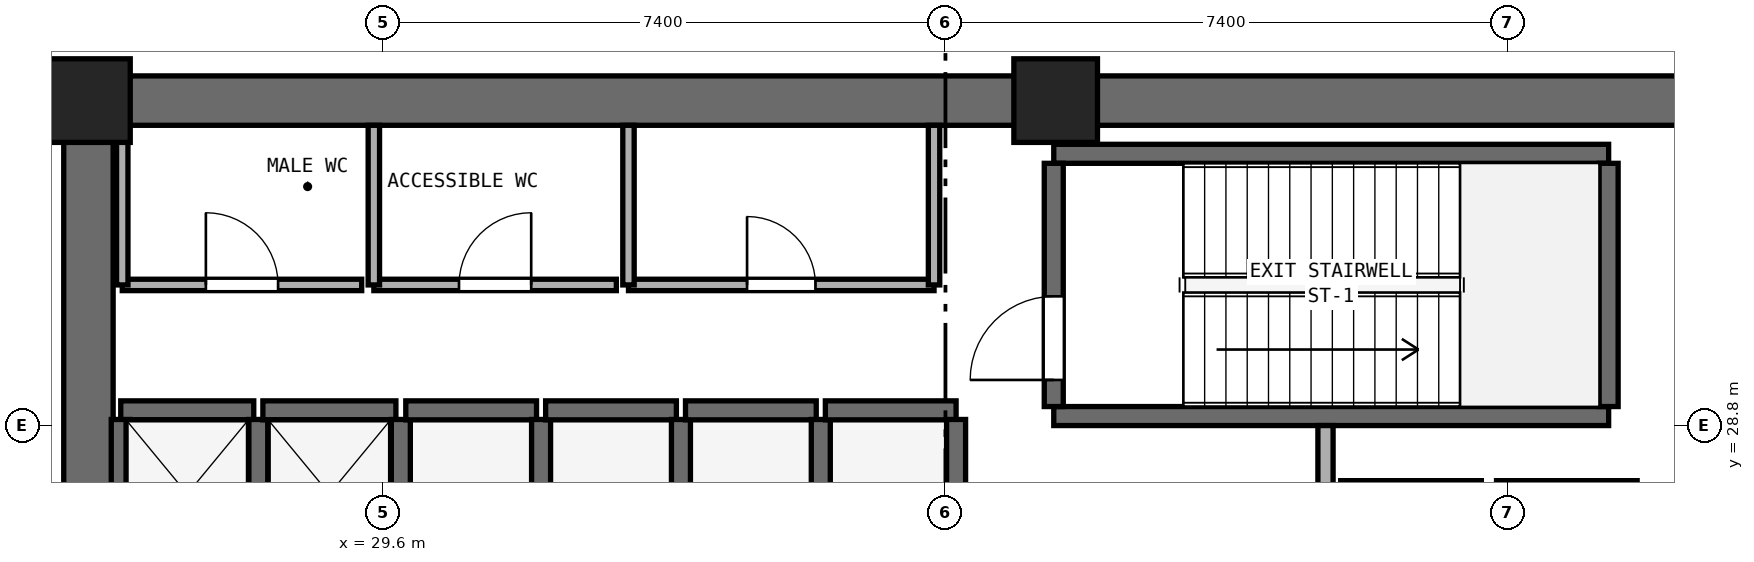
"""IFC4 building model, lengths in metres.
Left out: names, types, materials, properties, quantities, classifications, styles, units other than length and angle.
Written with IfcOpenShell. Run it as: python <this file> out.ifc"""

import sys

from ifc_helpers import new_model, si_unit, direction, frame, frame_2d, origin, origin_2d, place, context, subcontext, project, spatial, rectangle, extrude, element, fill, save


model = new_model("IFC4")
c1 = context("Model", 3, precision=1e-05, world=origin(), true_north=direction((0.0, 1.0)))
c2 = subcontext(c1, "Body", "Model", "MODEL_VIEW")
j1 = project(units=[si_unit("LENGTHUNIT", "METRE"), si_unit("PLANEANGLEUNIT", "RADIAN")], contexts=[c1])
p1 = place(None, origin())
s1 = spatial("IfcSite", under=j1, at=p1, CompositionType="ELEMENT")
p2 = place(p1, origin())
s2 = spatial("IfcBuilding", under=s1, at=p2, CompositionType="ELEMENT")
p3 = place(p2, frame((0.0, 0.0, 20.0)))
s3 = spatial("IfcBuildingStorey", under=s2, at=p3, CompositionType="ELEMENT", Elevation=20.0)
p4 = place(p3, frame((25.4, 33.075, 0.0), z_axis=(0.0, 0.0, 1.0), x_axis=(1.0, 0.0, 0.0)))
e1 = element("IfcWall", 1, at=p4, inside=s3, PredefinedType="SHEAR", context=c2, shape_type="SweptSolid", body=[
    extrude(rectangle(XDim=23.2, YDim=0.65, at=frame_2d((11.6, 0.0))), origin(), (0.0, 0.0, 1.0), 4.6),
])
p5 = place(p3, frame((25.725, 17.65, 0.0), z_axis=(0.0, 0.0, 1.0), x_axis=(0.0, 1.0, 0.0)))
e2 = element("IfcWall", 2, at=p5, inside=s3, PredefinedType="SHEAR", context=c2, shape_type="SweptSolid", body=[
    extrude(rectangle(XDim=15.1, YDim=0.65, at=frame_2d((7.55, 0.0))), origin(), (0.0, 0.0, 1.0), 4.6),
])
p6 = place(p5, frame((6.8, 0.0, 0.0)))
e3 = element("IfcOpeningElement", 3, at=p6, cuts=e2, PredefinedType="OPENING", context=c2, shape_type="SweptSolid", body=[
    extrude(rectangle(XDim=1.5, YDim=2.15, at=frame_2d((0.75, 1.075))), frame((0.0, 0.335, 0.0), z_axis=(0.0, -1.0, 0.0), x_axis=(1.0, 0.0, 0.0)), (0.0, 0.0, 1.0), 0.67),
])
for number, where, z_axis, x_axis in (
    (4, (38.45, 33.075, 0.0), (0.0, 0.0, 1.0), (1.0, 0.0, 0.0)),
    (5, (25.725, 33.075, 0.0), (0.0, 0.0, 1.0), (1.0, 0.0, 0.0)),
):
    element("IfcColumn", number, at=place(p3, frame(where, z_axis=z_axis, x_axis=x_axis)), inside=s3, PredefinedType="PILASTER", context=c2, shape_type="SweptSolid", body=[
        extrude(rectangle(XDim=1.1, YDim=1.1, at=origin_2d()), origin(), (0.0, 0.0, 1.0), 5.0),
    ])
for number, where, z_axis, x_axis in (
    (6, (38.425, 28.925, 0.0), (0.0, 0.0, 1.0), (1.0, 0.0, 0.0)),
    (7, (38.425, 32.375, 0.0), (0.0, 0.0, 1.0), (1.0, 0.0, 0.0)),
):
    element("IfcWall", number, at=place(p3, frame(where, z_axis=z_axis, x_axis=x_axis)), inside=s3, PredefinedType="SHEAR", context=c2, shape_type="SweptSolid", body=[
        extrude(rectangle(XDim=7.3, YDim=0.25, at=frame_2d((3.65, 0.0))), origin(), (0.0, 0.0, 1.0), 4.6),
    ])
p7 = place(p3, frame((38.425, 29.05, 0.0), z_axis=(0.0, 0.0, 1.0), x_axis=(0.0, 1.0, 0.0)))
e8 = element("IfcWall", 8, at=p7, inside=s3, PredefinedType="SHEAR", context=c2, shape_type="SweptSolid", body=[
    extrude(rectangle(XDim=3.2, YDim=0.25, at=frame_2d((1.6, 0.0))), origin(), (0.0, 0.0, 1.0), 4.6),
])
p8 = place(p7, frame((0.35, 0.0, 0.0)))
e9 = element("IfcOpeningElement", 9, at=p8, cuts=e8, PredefinedType="OPENING", context=c2, shape_type="SweptSolid", body=[
    extrude(rectangle(XDim=1.1, YDim=2.15, at=frame_2d((0.55, 1.075))), frame((0.0, 0.135, 0.0), z_axis=(0.0, -1.0, 0.0), x_axis=(1.0, 0.0, 0.0)), (0.0, 0.0, 1.0), 0.27),
])
p9 = place(p3, frame((45.725, 29.05, 0.0), z_axis=(0.0, 0.0, 1.0), x_axis=(0.0, 1.0, 0.0)))
e10 = element("IfcWall", 10, at=p9, inside=s3, PredefinedType="SHEAR", context=c2, shape_type="SweptSolid", body=[
    extrude(rectangle(XDim=3.2, YDim=0.25, at=frame_2d((1.6, 0.0))), origin(), (0.0, 0.0, 1.0), 4.6),
])
p10 = place(p3, frame((26.15, 29.0, 0.0), z_axis=(0.0, 0.0, 1.0), x_axis=(1.0, 0.0, 0.0)))
e11 = element("IfcWall", 11, at=p10, inside=s3, PredefinedType="SHEAR", context=c2, shape_type="SweptSolid", body=[
    extrude(rectangle(XDim=1.75, YDim=0.25, at=frame_2d((0.875, 0.0))), origin(), (0.0, 0.0, 1.0), 4.6),
])
for number, where, z_axis, x_axis in (
    (12, (26.15, 26.92, 0.0), (0.0, 0.0, 1.0), (0.0, 1.0, 0.0)),
    (13, (27.96, 26.92, 0.0), (0.0, 0.0, 1.0), (0.0, 1.0, 0.0)),
):
    element("IfcWall", number, at=place(p3, frame(where, z_axis=z_axis, x_axis=x_axis)), inside=s3, PredefinedType="SHEAR", context=c2, shape_type="SweptSolid", body=[
        extrude(rectangle(XDim=1.96, YDim=0.25, at=frame_2d((0.98, 0.0))), origin(), (0.0, 0.0, 1.0), 4.6),
    ])
p11 = place(p3, frame((28.02, 29.0, 0.0), z_axis=(0.0, 0.0, 1.0), x_axis=(1.0, 0.0, 0.0)))
e14 = element("IfcWall", 14, at=p11, inside=s3, PredefinedType="SHEAR", context=c2, shape_type="SweptSolid", body=[
    extrude(rectangle(XDim=1.75, YDim=0.25, at=frame_2d((0.875, 0.0))), origin(), (0.0, 0.0, 1.0), 4.6),
])
p12 = place(p3, frame((29.835, 26.92, 0.0), z_axis=(0.0, 0.0, 1.0), x_axis=(0.0, 1.0, 0.0)))
e15 = element("IfcWall", 15, at=p12, inside=s3, PredefinedType="SHEAR", context=c2, shape_type="SweptSolid", body=[
    extrude(rectangle(XDim=1.96, YDim=0.25, at=frame_2d((0.98, 0.0))), origin(), (0.0, 0.0, 1.0), 4.6),
])
p13 = place(p3, frame((29.9, 29.0, 0.0), z_axis=(0.0, 0.0, 1.0), x_axis=(1.0, 0.0, 0.0)))
e16 = element("IfcWall", 16, at=p13, inside=s3, PredefinedType="SHEAR", context=c2, shape_type="SweptSolid", body=[
    extrude(rectangle(XDim=1.72, YDim=0.25, at=frame_2d((0.86, 0.0))), origin(), (0.0, 0.0, 1.0), 4.6),
])
p14 = place(p3, frame((31.68, 26.92, 0.0), z_axis=(0.0, 0.0, 1.0), x_axis=(0.0, 1.0, 0.0)))
e17 = element("IfcWall", 17, at=p14, inside=s3, PredefinedType="SHEAR", context=c2, shape_type="SweptSolid", body=[
    extrude(rectangle(XDim=1.96, YDim=0.25, at=frame_2d((0.98, 0.0))), origin(), (0.0, 0.0, 1.0), 4.6),
])
p15 = place(p3, frame((31.74, 29.0, 0.0), z_axis=(0.0, 0.0, 1.0), x_axis=(1.0, 0.0, 0.0)))
e18 = element("IfcWall", 18, at=p15, inside=s3, PredefinedType="SHEAR", context=c2, shape_type="SweptSolid", body=[
    extrude(rectangle(XDim=1.72, YDim=0.25, at=frame_2d((0.86, 0.0))), origin(), (0.0, 0.0, 1.0), 4.6),
])
p16 = place(p3, frame((33.52, 26.92, 0.0), z_axis=(0.0, 0.0, 1.0), x_axis=(0.0, 1.0, 0.0)))
e19 = element("IfcWall", 19, at=p16, inside=s3, PredefinedType="SHEAR", context=c2, shape_type="SweptSolid", body=[
    extrude(rectangle(XDim=1.96, YDim=0.25, at=frame_2d((0.98, 0.0))), origin(), (0.0, 0.0, 1.0), 4.6),
])
p17 = place(p3, frame((33.58, 29.0, 0.0), z_axis=(0.0, 0.0, 1.0), x_axis=(1.0, 0.0, 0.0)))
e20 = element("IfcWall", 20, at=p17, inside=s3, PredefinedType="SHEAR", context=c2, shape_type="SweptSolid", body=[
    extrude(rectangle(XDim=1.72, YDim=0.25, at=frame_2d((0.86, 0.0))), origin(), (0.0, 0.0, 1.0), 4.6),
])
p18 = place(p3, frame((35.36, 26.92, 0.0), z_axis=(0.0, 0.0, 1.0), x_axis=(0.0, 1.0, 0.0)))
e21 = element("IfcWall", 21, at=p18, inside=s3, PredefinedType="SHEAR", context=c2, shape_type="SweptSolid", body=[
    extrude(rectangle(XDim=1.96, YDim=0.25, at=frame_2d((0.98, 0.0))), origin(), (0.0, 0.0, 1.0), 4.6),
])
p19 = place(p3, frame((35.42, 29.0, 0.0), z_axis=(0.0, 0.0, 1.0), x_axis=(1.0, 0.0, 0.0)))
e22 = element("IfcWall", 22, at=p19, inside=s3, PredefinedType="SHEAR", context=c2, shape_type="SweptSolid", body=[
    extrude(rectangle(XDim=1.72, YDim=0.25, at=frame_2d((0.86, 0.0))), origin(), (0.0, 0.0, 1.0), 4.6),
])
p20 = place(p3, frame((37.14, 26.92, 0.0), z_axis=(0.0, 0.0, 1.0), x_axis=(0.0, 1.0, 0.0)))
e23 = element("IfcWall", 23, at=p20, inside=s3, PredefinedType="SHEAR", context=c2, shape_type="SweptSolid", body=[
    extrude(rectangle(XDim=1.96, YDim=0.25, at=frame_2d((0.98, 0.0))), origin(), (0.0, 0.0, 1.0), 4.6),
])
for number, where, z_axis, x_axis in (
    (24, (42.2, 27.95, 0.0), (0.0, 0.0, 1.0), (1.0, 0.0, 0.0)),
    (25, (44.25, 27.95, 0.0), (0.0, 0.0, 1.0), (1.0, 0.0, 0.0)),
):
    element("IfcWall", number, at=place(p3, frame(where, z_axis=z_axis, x_axis=x_axis)), inside=s3, PredefinedType="SHEAR", context=c2, shape_type="SweptSolid", body=[
        extrude(rectangle(XDim=1.85, YDim=0.25, at=frame_2d((0.925, 0.0))), origin(), (0.0, 0.0, 1.0), 4.6),
    ])
p21 = place(p3, frame((42.0, 22.75, 0.0), z_axis=(0.0, 0.0, 1.0), x_axis=(0.0, 1.0, 0.0)))
e26 = element("IfcWall", 26, at=p21, inside=s3, PredefinedType="SOLIDWALL", context=c2, shape_type="SweptSolid", body=[
    extrude(rectangle(XDim=6.05, YDim=0.2, at=frame_2d((3.025, 0.0))), origin(), (0.0, 0.0, 1.0), 4.6),
])
p22 = place(p21, frame((0.65, 0.0, 0.0)))
e27 = element("IfcOpeningElement", 27, at=p22, cuts=e26, PredefinedType="OPENING", context=c2, shape_type="SweptSolid", body=[
    extrude(rectangle(XDim=1.2, YDim=2.15, at=frame_2d((0.6, 1.075))), frame((0.0, 0.11, 0.0), z_axis=(0.0, -1.0, 0.0), x_axis=(1.0, 0.0, 0.0)), (0.0, 0.0, 1.0), 0.22),
])
p23 = place(p3, frame((26.17, 30.65, 0.0), z_axis=(0.0, 0.0, 1.0), x_axis=(1.0, 0.0, 0.0)))
e28 = element("IfcWall", 28, at=p23, inside=s3, PredefinedType="PARTITIONING", context=c2, shape_type="SweptSolid", body=[
    extrude(rectangle(XDim=3.15, YDim=0.15, at=frame_2d((1.575, 0.0))), origin(), (0.0, 0.0, 1.0), 4.6),
])
p24 = place(p23, frame((1.1, 0.0, 0.0)))
e29 = element("IfcOpeningElement", 29, at=p24, cuts=e28, PredefinedType="OPENING", context=c2, shape_type="SweptSolid", body=[
    extrude(rectangle(XDim=0.95, YDim=2.1, at=frame_2d((0.475, 1.05))), frame((0.0, 0.085, 0.0), z_axis=(0.0, -1.0, 0.0), x_axis=(1.0, 0.0, 0.0)), (0.0, 0.0, 1.0), 0.17),
])
p25 = place(p3, frame((26.17, 30.65, 0.0), z_axis=(0.0, 0.0, 1.0), x_axis=(0.0, 1.0, 0.0)))
e30 = element("IfcWall", 30, at=p25, inside=s3, PredefinedType="PARTITIONING", context=c2, shape_type="SweptSolid", body=[
    extrude(rectangle(XDim=2.1, YDim=0.15, at=frame_2d((1.05, 0.0))), origin(), (0.0, 0.0, 1.0), 4.6),
])
p26 = place(p3, frame((29.48, 30.65, 0.0), z_axis=(0.0, 0.0, 1.0), x_axis=(1.0, 0.0, 0.0)))
e31 = element("IfcWall", 31, at=p26, inside=s3, PredefinedType="PARTITIONING", context=c2, shape_type="SweptSolid", body=[
    extrude(rectangle(XDim=3.19, YDim=0.15, at=frame_2d((1.595, 0.0))), origin(), (0.0, 0.0, 1.0), 4.6),
])
p27 = place(p26, frame((1.12, 0.0, 0.0)))
e32 = element("IfcOpeningElement", 32, at=p27, cuts=e31, PredefinedType="OPENING", context=c2, shape_type="SweptSolid", body=[
    extrude(rectangle(XDim=0.95, YDim=2.1, at=frame_2d((0.475, 1.05))), frame((0.0, 0.085, 0.0), z_axis=(0.0, -1.0, 0.0), x_axis=(1.0, 0.0, 0.0)), (0.0, 0.0, 1.0), 0.17),
])
p28 = place(p3, frame((29.48, 30.65, 0.0), z_axis=(0.0, 0.0, 1.0), x_axis=(0.0, 1.0, 0.0)))
e33 = element("IfcWall", 33, at=p28, inside=s3, PredefinedType="PARTITIONING", context=c2, shape_type="SweptSolid", body=[
    extrude(rectangle(XDim=2.1, YDim=0.15, at=frame_2d((1.05, 0.0))), origin(), (0.0, 0.0, 1.0), 4.6),
])
p29 = place(p3, frame((32.83, 30.65, 0.0), z_axis=(0.0, 0.0, 1.0), x_axis=(1.0, 0.0, 0.0)))
e34 = element("IfcWall", 34, at=p29, inside=s3, PredefinedType="PARTITIONING", context=c2, shape_type="SweptSolid", body=[
    extrude(rectangle(XDim=4.02, YDim=0.15, at=frame_2d((2.01, 0.0))), origin(), (0.0, 0.0, 1.0), 4.6),
])
p30 = place(p29, frame((1.56, 0.0, 0.0)))
e35 = element("IfcOpeningElement", 35, at=p30, cuts=e34, PredefinedType="OPENING", context=c2, shape_type="SweptSolid", body=[
    extrude(rectangle(XDim=0.9, YDim=2.1, at=frame_2d((0.45, 1.05))), frame((0.0, 0.085, 0.0), z_axis=(0.0, -1.0, 0.0), x_axis=(1.0, 0.0, 0.0)), (0.0, 0.0, 1.0), 0.17),
])
for number, where, z_axis, x_axis in (
    (36, (32.83, 30.65, 0.0), (0.0, 0.0, 1.0), (0.0, 1.0, 0.0)),
    (37, (36.85, 30.65, 0.0), (0.0, 0.0, 1.0), (0.0, 1.0, 0.0)),
):
    element("IfcWall", number, at=place(p3, frame(where, z_axis=z_axis, x_axis=x_axis)), inside=s3, PredefinedType="PARTITIONING", context=c2, shape_type="SweptSolid", body=[
        extrude(rectangle(XDim=2.1, YDim=0.15, at=frame_2d((1.05, 0.0))), origin(), (0.0, 0.0, 1.0), 4.6),
    ])
p31 = place(p8, origin())
e38 = element("IfcDoor", 38, at=p31, inside=s3, OperationType="SINGLE_SWING_LEFT", PredefinedType="DOOR", context=c2, shape_type="SweptSolid", body=[
    extrude(rectangle(XDim=1.1, YDim=2.15, at=frame_2d((0.55, 1.075))), frame((0.0, 0.025, 0.0), z_axis=(0.0, -1.0, 0.0), x_axis=(1.0, 0.0, 0.0)), (0.0, 0.0, 1.0), 0.05),
])
fill(e9, e38)
p32 = place(p24, origin())
e39 = element("IfcDoor", 39, at=p32, inside=s3, OperationType="SINGLE_SWING_LEFT", PredefinedType="DOOR", context=c2, shape_type="SweptSolid", body=[
    extrude(rectangle(XDim=0.95, YDim=2.1, at=frame_2d((0.475, 1.05))), frame((0.0, 0.025, 0.0), z_axis=(0.0, -1.0, 0.0), x_axis=(1.0, 0.0, 0.0)), (0.0, 0.0, 1.0), 0.05),
])
fill(e29, e39)
p33 = place(p27, origin())
e40 = element("IfcDoor", 40, at=p33, inside=s3, OperationType="SINGLE_SWING_RIGHT", PredefinedType="DOOR", context=c2, shape_type="SweptSolid", body=[
    extrude(rectangle(XDim=0.95, YDim=2.1, at=frame_2d((0.475, 1.05))), frame((0.0, 0.025, 0.0), z_axis=(0.0, -1.0, 0.0), x_axis=(1.0, 0.0, 0.0)), (0.0, 0.0, 1.0), 0.05),
])
fill(e32, e40)
p34 = place(p30, origin())
e41 = element("IfcDoor", 41, at=p34, inside=s3, OperationType="SINGLE_SWING_LEFT", PredefinedType="DOOR", context=c2, shape_type="SweptSolid", body=[
    extrude(rectangle(XDim=0.9, YDim=2.1, at=frame_2d((0.45, 1.05))), frame((0.0, 0.025, 0.0), z_axis=(0.0, -1.0, 0.0), x_axis=(1.0, 0.0, 0.0)), (0.0, 0.0, 1.0), 0.05),
])
fill(e35, e41)
save(model, sys.argv[1])
